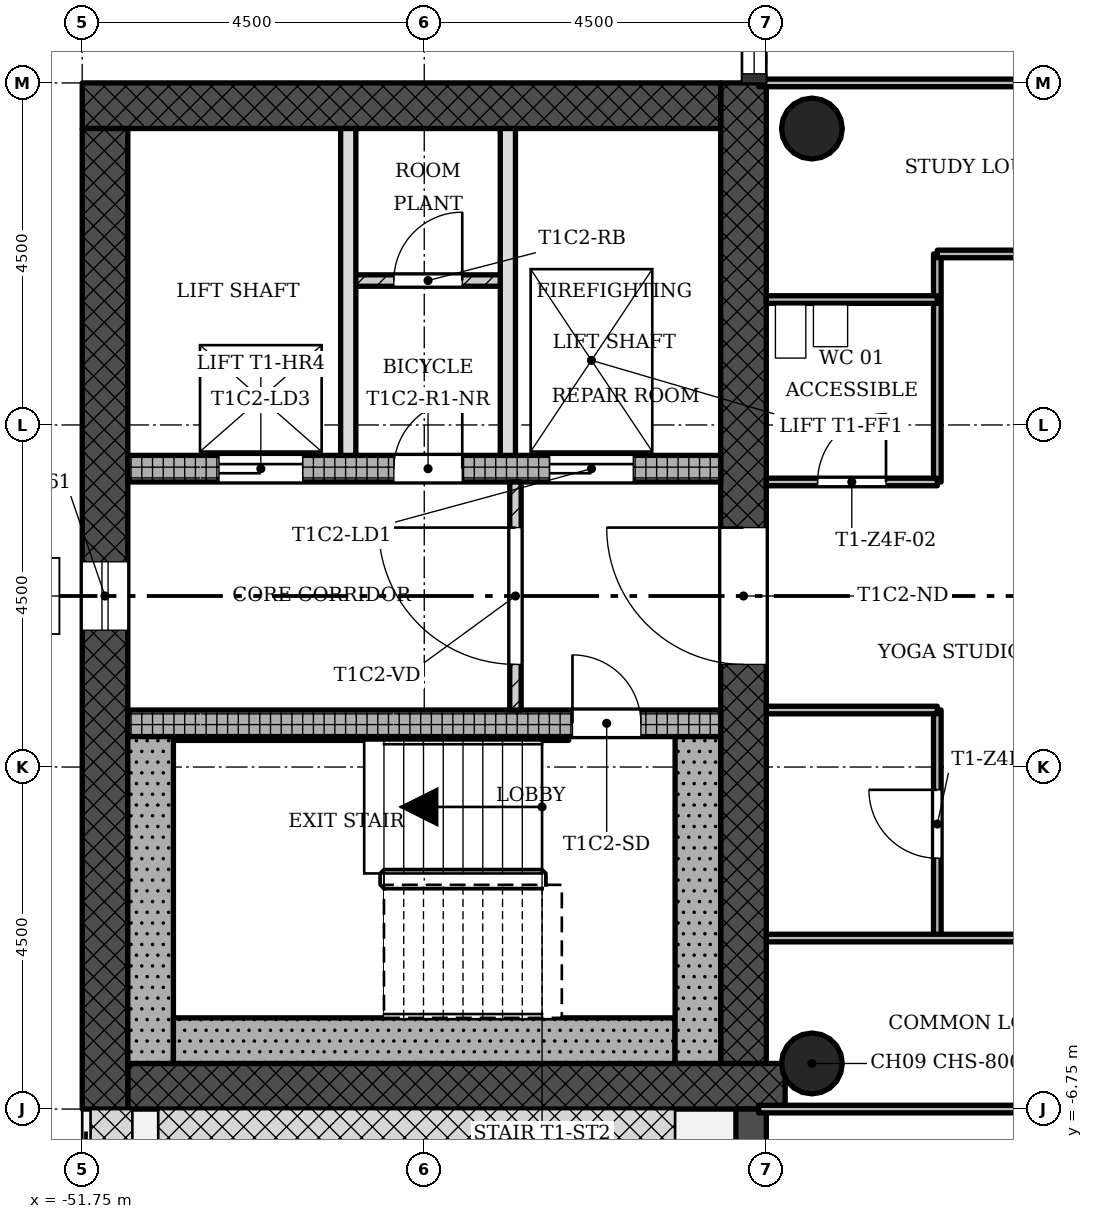
"""IFC4 building model, lengths in metres.
Left out: names, types, materials, properties, quantities, classifications, styles, units other than length and angle.
Written with IfcOpenShell. Run it as: python <this file> out.ifc"""

import sys

from ifc_helpers import new_model, si_unit, direction, frame, frame_2d, origin, origin_2d, place, context, subcontext, project, spatial, rectangle, hollow_circle, extrude, element, fill, save


model = new_model("IFC4")
c1 = context("Model", 3, precision=1e-05, world=origin(), true_north=direction((0.0, 1.0)))
c2 = subcontext(c1, "Body", "Model", "MODEL_VIEW")
j1 = project(units=[si_unit("LENGTHUNIT", "METRE"), si_unit("PLANEANGLEUNIT", "RADIAN")], contexts=[c1])
p1 = place(None, origin())
s1 = spatial("IfcSite", under=j1, at=p1, CompositionType="ELEMENT")
p2 = place(p1, origin())
s2 = spatial("IfcBuilding", under=s1, at=p2, CompositionType="ELEMENT")
p3 = place(p2, frame((0.0, 0.0, 219.8)))
s3 = spatial("IfcBuildingStorey", under=s2, at=p3, CompositionType="ELEMENT", Elevation=219.8)
p4 = place(p3, frame((-51.15, -6.45, 0.0), z_axis=(0.0, 0.0, 1.0), x_axis=(1.0, 0.0, 0.0)))
e1 = element("IfcWall", 1, at=p4, inside=s3, PredefinedType="SHEAR", context=c2, shape_type="SweptSolid", body=[
    extrude(rectangle(XDim=8.648, YDim=0.6, at=frame_2d((4.324, 0.0))), origin(), (0.0, 0.0, 1.0), 3.4),
])
p5 = place(p3, frame((-43.05, -6.15, 0.0), z_axis=(0.0, 0.0, 1.0), x_axis=(0.0, 1.0, 0.0)))
e2 = element("IfcWall", 2, at=p5, inside=s3, PredefinedType="SHEAR", context=c2, shape_type="SweptSolid", body=[
    extrude(rectangle(XDim=12.9, YDim=0.6, at=frame_2d((6.45, 0.0))), origin(), (0.0, 0.0, 1.0), 3.4),
])
p6 = place(p5, frame((5.25, 0.0, 0.0)))
e3 = element("IfcOpeningElement", 3, at=p6, cuts=e2, PredefinedType="OPENING", context=c2, shape_type="SweptSolid", body=[
    extrude(rectangle(XDim=1.8, YDim=2.1, at=frame_2d((0.9, 1.05))), frame((0.0, 0.31, 0.0), z_axis=(0.0, -1.0, 0.0), x_axis=(1.0, 0.0, 0.0)), (0.0, 0.0, 1.0), 0.62),
])
p7 = place(p3, frame((-43.35, 6.45, 0.0), z_axis=(0.0, 0.0, 1.0), x_axis=(-1.0, 0.0, 0.0)))
e4 = element("IfcWall", 4, at=p7, inside=s3, PredefinedType="SHEAR", context=c2, shape_type="SweptSolid", body=[
    extrude(rectangle(XDim=8.4, YDim=0.6, at=frame_2d((4.2, 0.0))), origin(), (0.0, 0.0, 1.0), 3.4),
])
p8 = place(p3, frame((-51.45, 6.15, 0.0), z_axis=(0.0, 0.0, 1.0), x_axis=(0.0, -1.0, 0.0)))
e5 = element("IfcWall", 5, at=p8, inside=s3, PredefinedType="SHEAR", context=c2, shape_type="SweptSolid", body=[
    extrude(rectangle(XDim=12.9, YDim=0.6, at=frame_2d((6.45, 0.0))), origin(), (0.0, 0.0, 1.0), 3.4),
])
p9 = place(p8, frame((5.7, 0.0, 0.45)))
e6 = element("IfcOpeningElement", 6, at=p9, cuts=e5, PredefinedType="OPENING", context=c2, shape_type="SweptSolid", body=[
    extrude(rectangle(XDim=0.9, YDim=2.4, at=frame_2d((0.45, 1.2))), frame((0.0, 0.31, 0.0), z_axis=(0.0, -1.0, 0.0), x_axis=(1.0, 0.0, 0.0)), (0.0, 0.0, 1.0), 0.62),
])
p10 = place(p3, frame((-51.15, -1.675, 0.0), z_axis=(0.0, 0.0, 1.0), x_axis=(1.0, 0.0, 0.0)))
e7 = element("IfcWall", 7, at=p10, inside=s3, PredefinedType="SHEAR", context=c2, shape_type="SweptSolid", body=[
    extrude(rectangle(XDim=7.8, YDim=0.35, at=frame_2d((3.9, 0.0))), origin(), (0.0, 0.0, 1.0), 3.4),
])
p11 = place(p10, frame((5.85, 0.0, 0.0)))
e8 = element("IfcOpeningElement", 8, at=p11, cuts=e7, PredefinedType="OPENING", context=c2, shape_type="SweptSolid", body=[
    extrude(rectangle(XDim=0.9, YDim=2.1, at=frame_2d((0.45, 1.05))), frame((0.0, 0.185, 0.0), z_axis=(0.0, -1.0, 0.0), x_axis=(1.0, 0.0, 0.0)), (0.0, 0.0, 1.0), 0.37),
])
p12 = place(p3, frame((-51.15, 1.675, 0.0), z_axis=(0.0, 0.0, 1.0), x_axis=(1.0, 0.0, 0.0)))
e9 = element("IfcWall", 9, at=p12, inside=s3, PredefinedType="SHEAR", context=c2, shape_type="SweptSolid", body=[
    extrude(rectangle(XDim=7.8, YDim=0.35, at=frame_2d((3.9, 0.0))), origin(), (0.0, 0.0, 1.0), 3.4),
])
p13 = place(p12, frame((5.55, 0.0, 0.0)))
e10 = element("IfcOpeningElement", 10, at=p13, cuts=e9, PredefinedType="OPENING", context=c2, shape_type="SweptSolid", body=[
    extrude(rectangle(XDim=1.1, YDim=2.1, at=frame_2d((0.55, 1.05))), frame((0.0, 0.185, 0.0), z_axis=(0.0, -1.0, 0.0), x_axis=(1.0, 0.0, 0.0)), (0.0, 0.0, 1.0), 0.37),
])
p14 = place(p12, frame((1.2, 0.0, 0.0)))
e11 = element("IfcOpeningElement", 11, at=p14, cuts=e9, PredefinedType="OPENING", context=c2, shape_type="SweptSolid", body=[
    extrude(rectangle(XDim=1.1, YDim=2.1, at=frame_2d((0.55, 1.05))), frame((0.0, 0.185, 0.0), z_axis=(0.0, -1.0, 0.0), x_axis=(1.0, 0.0, 0.0)), (0.0, 0.0, 1.0), 0.37),
])
p15 = place(p12, frame((3.5, 0.0, 0.0)))
e12 = element("IfcOpeningElement", 12, at=p15, cuts=e9, PredefinedType="OPENING", context=c2, shape_type="SweptSolid", body=[
    extrude(rectangle(XDim=0.9, YDim=2.1, at=frame_2d((0.45, 1.05))), frame((0.0, 0.185, 0.0), z_axis=(0.0, -1.0, 0.0), x_axis=(1.0, 0.0, 0.0)), (0.0, 0.0, 1.0), 0.37),
])
for number, where, z_axis, x_axis in (
    (13, (-42.15, -6.15, 0.0), (0.0, 0.0, 1.0), (1.0, 0.0, 0.0)),
    (14, (-42.15, 6.15, 0.0), (0.0, 0.0, 1.0), (1.0, 0.0, 0.0)),
):
    element("IfcColumn", number, at=place(p3, frame(where, z_axis=z_axis, x_axis=x_axis)), inside=s3, PredefinedType="COLUMN", context=c2, shape_type="SweptSolid", body=[
        extrude(hollow_circle(Radius=0.4, WallThickness=0.028, at=origin_2d()), origin(), (0.0, 0.0, 1.0), 3.4),
    ])
p16 = place(p3, frame((-42.95, -6.75, -0.02), z_axis=(0.0, 0.0, 1.0), x_axis=(0.0, -1.0, 0.0)))
e15 = element("IfcWall", 15, at=p16, inside=s3, PredefinedType="STANDARD", context=c2, shape_type="SweptSolid", body=[
    extrude(rectangle(XDim=4.5, YDim=0.4, at=frame_2d((2.25, 0.0))), origin(), (0.0, 0.0, 1.0), 3.12),
])
p17 = place(p16, frame((1.35, 0.0, 0.02)))
e16 = element("IfcOpeningElement", 16, at=p17, cuts=e15, PredefinedType="OPENING", context=c2, shape_type="SweptSolid", body=[
    extrude(rectangle(XDim=1.8, YDim=2.1, at=frame_2d((0.9, 1.05))), frame((0.0, 0.21, 0.0), z_axis=(0.0, -1.0, 0.0), x_axis=(1.0, 0.0, 0.0)), (0.0, 0.0, 1.0), 0.42),
])
p18 = place(p3, frame((-46.05, 1.5, 0.0), z_axis=(0.0, 0.0, 1.0), x_axis=(0.0, -1.0, 0.0)))
e17 = element("IfcWall", 17, at=p18, inside=s3, PredefinedType="PARTITIONING", context=c2, shape_type="SweptSolid", body=[
    extrude(rectangle(XDim=3.0, YDim=0.15, at=frame_2d((1.5, 0.0))), origin(), (0.0, 0.0, 1.0), 3.0),
])
p19 = place(p18, frame((0.6, 0.0, 0.0)))
e18 = element("IfcOpeningElement", 18, at=p19, cuts=e17, PredefinedType="OPENING", context=c2, shape_type="SweptSolid", body=[
    extrude(rectangle(XDim=1.8, YDim=2.1, at=frame_2d((0.9, 1.05))), frame((0.0, 0.085, 0.0), z_axis=(0.0, -1.0, 0.0), x_axis=(1.0, 0.0, 0.0)), (0.0, 0.0, 1.0), 0.17),
])
for number, where, z_axis, x_axis in (
    (19, (-48.25, 6.15, 0.0), (0.0, 0.0, 1.0), (0.0, -1.0, 0.0)),
    (20, (-46.15, 6.15, 0.0), (0.0, 0.0, 1.0), (0.0, -1.0, 0.0)),
):
    element("IfcWall", number, at=place(p3, frame(where, z_axis=z_axis, x_axis=x_axis)), inside=s3, PredefinedType="SOLIDWALL", context=c2, shape_type="SweptSolid", body=[
        extrude(rectangle(XDim=4.3, YDim=0.2, at=frame_2d((2.15, 0.0))), origin(), (0.0, 0.0, 1.0), 3.0),
    ])
p20 = place(p3, frame((-46.15, 4.15, 0.0), z_axis=(0.0, 0.0, 1.0), x_axis=(-1.0, 0.0, 0.0)))
e21 = element("IfcWall", 21, at=p20, inside=s3, PredefinedType="PARTITIONING", context=c2, shape_type="SweptSolid", body=[
    extrude(rectangle(XDim=2.1, YDim=0.15, at=frame_2d((1.05, 0.0))), origin(), (0.0, 0.0, 1.0), 3.0),
])
p21 = place(p20, frame((0.6, 0.0, 0.0)))
e22 = element("IfcOpeningElement", 22, at=p21, cuts=e21, PredefinedType="OPENING", context=c2, shape_type="SweptSolid", body=[
    extrude(rectangle(XDim=0.9, YDim=2.1, at=frame_2d((0.45, 1.05))), frame((0.0, 0.085, 0.0), z_axis=(0.0, -1.0, 0.0), x_axis=(1.0, 0.0, 0.0)), (0.0, 0.0, 1.0), 0.17),
])
p22 = place(p3, frame((-40.5, -4.5, 0.0), z_axis=(0.0, 0.0, 1.0), x_axis=(0.0, 1.0, 0.0)))
e23 = element("IfcWall", 23, at=p22, inside=s3, PredefinedType="PARTITIONING", context=c2, shape_type="SweptSolid", body=[
    extrude(rectangle(XDim=3.0, YDim=0.1, at=frame_2d((1.5, 0.0))), origin(), (0.0, 0.0, 1.0), 3.0),
])
p23 = place(p22, frame((1.05, 0.0, 0.0)))
e24 = element("IfcOpeningElement", 24, at=p23, cuts=e23, PredefinedType="OPENING", context=c2, shape_type="SweptSolid", body=[
    extrude(rectangle(XDim=0.9, YDim=2.1, at=frame_2d((0.45, 1.05))), frame((0.0, 0.06, 0.0), z_axis=(0.0, -1.0, 0.0), x_axis=(1.0, 0.0, 0.0)), (0.0, 0.0, 1.0), 0.12),
])
p24 = place(p3, frame((-40.5, 1.5, 0.0), z_axis=(0.0, 0.0, 1.0), x_axis=(0.0, 1.0, 0.0)))
e25 = element("IfcWall", 25, at=p24, inside=s3, PredefinedType="PARTITIONING", context=c2, shape_type="SweptSolid", body=[
    extrude(rectangle(XDim=3.0, YDim=0.1, at=frame_2d((1.5, 0.0))), origin(), (0.0, 0.0, 1.0), 3.0),
])
p25 = place(p3, frame((-42.85, -6.75, 0.0), z_axis=(0.0, 0.0, 1.0), x_axis=(1.0, 0.0, 0.0)))
e26 = element("IfcWall", 26, at=p25, inside=s3, PredefinedType="PARTITIONING", context=c2, shape_type="SweptSolid", body=[
    extrude(rectangle(XDim=5.95, YDim=0.1, at=frame_2d((2.975, 0.0))), origin(), (0.0, 0.0, 1.0), 3.0),
])
p26 = place(p3, frame((-42.75, -4.5, 0.0), z_axis=(0.0, 0.0, 1.0), x_axis=(1.0, 0.0, 0.0)))
e27 = element("IfcWall", 27, at=p26, inside=s3, PredefinedType="PARTITIONING", context=c2, shape_type="SweptSolid", body=[
    extrude(rectangle(XDim=5.85, YDim=0.1, at=frame_2d((2.925, 0.0))), origin(), (0.0, 0.0, 1.0), 3.0),
])
p27 = place(p26, frame((3.6, 0.0, 0.0)))
e28 = element("IfcOpeningElement", 28, at=p27, cuts=e27, PredefinedType="OPENING", context=c2, shape_type="SweptSolid", body=[
    extrude(rectangle(XDim=0.9, YDim=2.1, at=frame_2d((0.45, 1.05))), frame((0.0, 0.06, 0.0), z_axis=(0.0, -1.0, 0.0), x_axis=(1.0, 0.0, 0.0)), (0.0, 0.0, 1.0), 0.12),
])
p28 = place(p3, frame((-42.75, -1.5, 0.0), z_axis=(0.0, 0.0, 1.0), x_axis=(1.0, 0.0, 0.0)))
e29 = element("IfcWall", 29, at=p28, inside=s3, PredefinedType="PARTITIONING", context=c2, shape_type="SweptSolid", body=[
    extrude(rectangle(XDim=2.25, YDim=0.1, at=frame_2d((1.125, 0.0))), origin(), (0.0, 0.0, 1.0), 3.0),
])
p29 = place(p3, frame((-42.75, 1.5, 0.0), z_axis=(0.0, 0.0, 1.0), x_axis=(1.0, 0.0, 0.0)))
e30 = element("IfcWall", 30, at=p29, inside=s3, PredefinedType="PARTITIONING", context=c2, shape_type="SweptSolid", body=[
    extrude(rectangle(XDim=2.25, YDim=0.1, at=frame_2d((1.125, 0.0))), origin(), (0.0, 0.0, 1.0), 3.0),
])
p30 = place(p29, frame((0.675, 0.0, 0.0)))
e31 = element("IfcOpeningElement", 31, at=p30, cuts=e30, PredefinedType="OPENING", context=c2, shape_type="SweptSolid", body=[
    extrude(rectangle(XDim=0.9, YDim=2.1, at=frame_2d((0.45, 1.05))), frame((0.0, 0.06, 0.0), z_axis=(0.0, -1.0, 0.0), x_axis=(1.0, 0.0, 0.0)), (0.0, 0.0, 1.0), 0.12),
])
p31 = place(p3, frame((-42.75, 3.9, 0.0), z_axis=(0.0, 0.0, 1.0), x_axis=(1.0, 0.0, 0.0)))
e32 = element("IfcWall", 32, at=p31, inside=s3, PredefinedType="PARTITIONING", context=c2, shape_type="SweptSolid", body=[
    extrude(rectangle(XDim=2.25, YDim=0.1, at=frame_2d((1.125, 0.0))), origin(), (0.0, 0.0, 1.0), 3.0),
])
p32 = place(p3, frame((-40.5, 4.5, 0.0), z_axis=(0.0, 0.0, 1.0), x_axis=(1.0, 0.0, 0.0)))
e33 = element("IfcWall", 33, at=p32, inside=s3, PredefinedType="PARTITIONING", context=c2, shape_type="SweptSolid", body=[
    extrude(rectangle(XDim=3.6, YDim=0.1, at=frame_2d((1.8, 0.0))), origin(), (0.0, 0.0, 1.0), 3.0),
])
p33 = place(p32, frame((1.35, 0.0, 0.0)))
e34 = element("IfcOpeningElement", 34, at=p33, cuts=e33, PredefinedType="OPENING", context=c2, shape_type="SweptSolid", body=[
    extrude(rectangle(XDim=0.9, YDim=2.1, at=frame_2d((0.45, 1.05))), frame((0.0, 0.06, 0.0), z_axis=(0.0, -1.0, 0.0), x_axis=(1.0, 0.0, 0.0)), (0.0, 0.0, 1.0), 0.12),
])
p34 = place(p3, frame((-42.85, 6.75, 0.0), z_axis=(0.0, 0.0, 1.0), x_axis=(1.0, 0.0, 0.0)))
e35 = element("IfcWall", 35, at=p34, inside=s3, PredefinedType="PARTITIONING", context=c2, shape_type="SweptSolid", body=[
    extrude(rectangle(XDim=5.95, YDim=0.1, at=frame_2d((2.975, 0.0))), origin(), (0.0, 0.0, 1.0), 3.0),
])
p35 = place(p3, frame((-50.85, -1.85, 0.0), z_axis=(0.0, 0.0, 1.0), x_axis=(0.0, -1.0, 0.0)))
e36 = element("IfcWall", 36, at=p35, inside=s3, PredefinedType="SHEAR", context=c2, shape_type="SweptSolid", body=[
    extrude(rectangle(XDim=4.3, YDim=0.6, at=frame_2d((2.15, 0.0))), origin(), (0.0, 0.0, 1.0), 3.4),
])
p36 = place(p3, frame((-43.95, -5.85, 0.0), z_axis=(0.0, 0.0, 1.0), x_axis=(-1.0, 0.0, 0.0)))
e37 = element("IfcWall", 37, at=p36, inside=s3, PredefinedType="SHEAR", context=c2, shape_type="SweptSolid", body=[
    extrude(rectangle(XDim=6.6, YDim=0.6, at=frame_2d((3.3, 0.0))), origin(), (0.0, 0.0, 1.0), 3.4),
])
p37 = place(p3, frame((-43.65, -1.85, 0.0), z_axis=(0.0, 0.0, 1.0), x_axis=(0.0, -1.0, 0.0)))
e38 = element("IfcWall", 38, at=p37, inside=s3, PredefinedType="SHEAR", context=c2, shape_type="SweptSolid", body=[
    extrude(rectangle(XDim=4.3, YDim=0.6, at=frame_2d((2.15, 0.0))), origin(), (0.0, 0.0, 1.0), 3.4),
])
p38 = place(p3, frame((-45.35, -1.875, 0.0), z_axis=(0.0, 0.0, 1.0), x_axis=(-1.0, 0.0, 0.0)))
e39 = element("IfcWall", 39, at=p38, inside=s3, PredefinedType="SHEAR", context=c2, shape_type="SweptSolid", body=[
    extrude(rectangle(XDim=5.2, YDim=0.05, at=frame_2d((2.6, 0.0))), origin(), (0.0, 0.0, 1.0), 3.4),
])
p39 = place(p9, origin())
e40 = element("IfcWindow", 40, at=p39, inside=s3, PartitioningType="SINGLE_PANEL", PredefinedType="WINDOW", context=c2, shape_type="SweptSolid", body=[
    extrude(rectangle(XDim=0.9, YDim=2.4, at=frame_2d((0.45, 1.2))), frame((0.0, 0.03, 0.0), z_axis=(0.0, -1.0, 0.0), x_axis=(1.0, 0.0, 0.0)), (0.0, 0.0, 1.0), 0.06),
])
fill(e6, e40)
p40 = place(p19, origin())
e41 = element("IfcDoor", 41, at=p40, inside=s3, OperationType="SINGLE_SWING_LEFT", PredefinedType="DOOR", context=c2, shape_type="SweptSolid", body=[
    extrude(rectangle(XDim=1.8, YDim=2.1, at=frame_2d((0.9, 1.05))), frame((0.0, 0.025, 0.0), z_axis=(0.0, -1.0, 0.0), x_axis=(1.0, 0.0, 0.0)), (0.0, 0.0, 1.0), 0.05),
])
fill(e18, e41)
p41 = place(p21, origin())
e42 = element("IfcDoor", 42, at=p41, inside=s3, OperationType="SINGLE_SWING_LEFT", PredefinedType="DOOR", context=c2, shape_type="SweptSolid", body=[
    extrude(rectangle(XDim=0.9, YDim=2.1, at=frame_2d((0.45, 1.05))), frame((0.0, 0.025, 0.0), z_axis=(0.0, -1.0, 0.0), x_axis=(1.0, 0.0, 0.0)), (0.0, 0.0, 1.0), 0.05),
])
fill(e22, e42)
p42 = place(p30, origin())
e43 = element("IfcDoor", 43, at=p42, inside=s3, OperationType="SINGLE_SWING_LEFT", PredefinedType="DOOR", context=c2, shape_type="SweptSolid", body=[
    extrude(rectangle(XDim=0.9, YDim=2.1, at=frame_2d((0.45, 1.05))), frame((0.0, 0.025, 0.0), z_axis=(0.0, -1.0, 0.0), x_axis=(1.0, 0.0, 0.0)), (0.0, 0.0, 1.0), 0.05),
])
fill(e31, e43)
p43 = place(p23, origin())
e44 = element("IfcDoor", 44, at=p43, inside=s3, OperationType="SINGLE_SWING_LEFT", PredefinedType="DOOR", context=c2, shape_type="SweptSolid", body=[
    extrude(rectangle(XDim=0.9, YDim=2.1, at=frame_2d((0.45, 1.05))), frame((0.0, 0.025, 0.0), z_axis=(0.0, -1.0, 0.0), x_axis=(1.0, 0.0, 0.0)), (0.0, 0.0, 1.0), 0.05),
])
fill(e24, e44)
p44 = place(p11, origin())
e45 = element("IfcDoor", 45, at=p44, inside=s3, OperationType="SINGLE_SWING_RIGHT", PredefinedType="DOOR", context=c2, shape_type="SweptSolid", body=[
    extrude(rectangle(XDim=0.9, YDim=2.1, at=frame_2d((0.45, 1.05))), frame((0.0, 0.025, 0.0), z_axis=(0.0, -1.0, 0.0), x_axis=(1.0, 0.0, 0.0)), (0.0, 0.0, 1.0), 0.05),
])
fill(e8, e45)
p45 = place(p13, origin())
e46 = element("IfcDoor", 46, at=p45, inside=s3, OperationType="SLIDING_TO_LEFT", PredefinedType="DOOR", context=c2, shape_type="SweptSolid", body=[
    extrude(rectangle(XDim=1.1, YDim=2.1, at=frame_2d((0.55, 1.05))), frame((0.0, 0.025, 0.0), z_axis=(0.0, -1.0, 0.0), x_axis=(1.0, 0.0, 0.0)), (0.0, 0.0, 1.0), 0.05),
])
fill(e10, e46)
p46 = place(p14, origin())
e47 = element("IfcDoor", 47, at=p46, inside=s3, OperationType="SLIDING_TO_LEFT", PredefinedType="DOOR", context=c2, shape_type="SweptSolid", body=[
    extrude(rectangle(XDim=1.1, YDim=2.1, at=frame_2d((0.55, 1.05))), frame((0.0, 0.025, 0.0), z_axis=(0.0, -1.0, 0.0), x_axis=(1.0, 0.0, 0.0)), (0.0, 0.0, 1.0), 0.05),
])
fill(e11, e47)
p47 = place(p15, origin())
e48 = element("IfcDoor", 48, at=p47, inside=s3, OperationType="SINGLE_SWING_LEFT", PredefinedType="DOOR", context=c2, shape_type="SweptSolid", body=[
    extrude(rectangle(XDim=0.9, YDim=2.1, at=frame_2d((0.45, 1.05))), frame((0.0, 0.025, 0.0), z_axis=(0.0, -1.0, 0.0), x_axis=(1.0, 0.0, 0.0)), (0.0, 0.0, 1.0), 0.05),
])
fill(e12, e48)
p48 = place(p6, origin())
e49 = element("IfcDoor", 49, at=p48, inside=s3, OperationType="SINGLE_SWING_LEFT", PredefinedType="DOOR", context=c2, shape_type="SweptSolid", body=[
    extrude(rectangle(XDim=1.8, YDim=2.1, at=frame_2d((0.9, 1.05))), frame((0.0, 0.025, 0.0), z_axis=(0.0, -1.0, 0.0), x_axis=(1.0, 0.0, 0.0)), (0.0, 0.0, 1.0), 0.05),
])
fill(e3, e49)
save(model, sys.argv[1])
